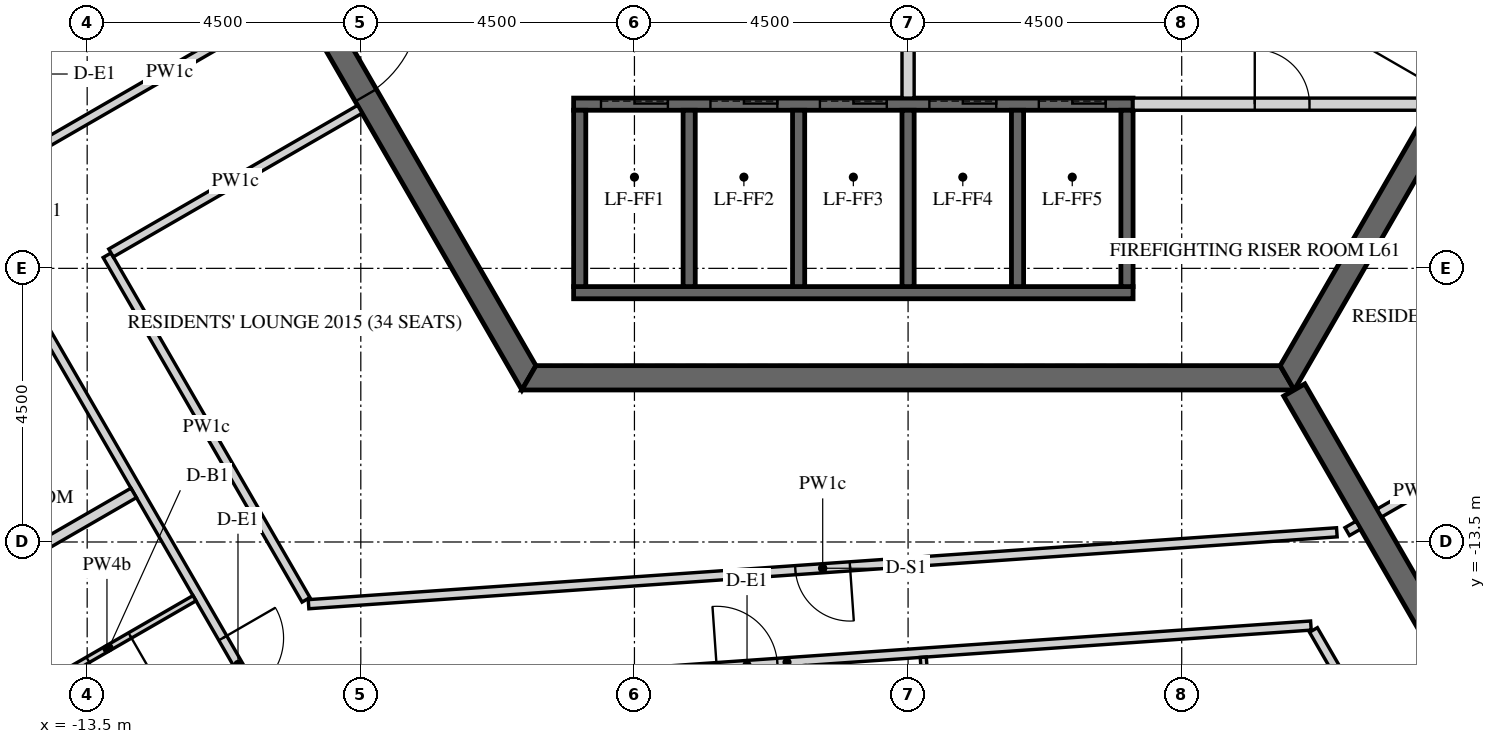
"""IFC4 building model, lengths in metres.
Left out: names, types, materials, properties, quantities, classifications, styles, units other than length and angle.
Written with IfcOpenShell. Run it as: python <this file> out.ifc"""

import sys

from ifc_helpers import new_model, si_unit, direction, frame, frame_2d, origin, place, context, subcontext, project, spatial, polyline, rectangle, outline, extrude, element, fill, save


model = new_model("IFC4")
c1 = context("Model", 3, precision=1e-05, world=origin(), true_north=direction((0.0, 1.0)))
c2 = subcontext(c1, "Body", "Model", "MODEL_VIEW")
j1 = project(units=[si_unit("LENGTHUNIT", "METRE"), si_unit("PLANEANGLEUNIT", "RADIAN")], contexts=[c1])
p1 = place(None, origin())
s1 = spatial("IfcSite", under=j1, at=p1, CompositionType="ELEMENT")
p2 = place(p1, origin())
s2 = spatial("IfcBuilding", under=s1, at=p2, CompositionType="ELEMENT")
p3 = place(p2, frame((0.0, 0.0, 256.2)))
s3 = spatial("IfcBuildingStorey", under=s2, at=p3, CompositionType="ELEMENT", Elevation=256.2)
p4 = place(p3, frame((-12.471, 0.0, 0.0), z_axis=(0.0, 0.0, 1.0), x_axis=(0.499996419489, -0.866027470984, 0.0)))
e1 = element("IfcWall", 1, at=p4, inside=s3, PredefinedType="SHEAR", context=c2, shape_type="SweptSolid", body=[
    extrude(outline(polyline([(-0.115, -0.2), (12.586, -0.2), (12.355, 0.2), (0.115, 0.2), (-0.115, -0.2)])), origin(), (0.0, 0.0, 1.0), 3.75),
])
p5 = place(p4, frame((5.306, 0.0, 0.0)))
e2 = element("IfcOpeningElement", 2, at=p5, cuts=e1, PredefinedType="OPENING", context=c2, shape_type="SweptSolid", body=[
    extrude(rectangle(XDim=1.8, YDim=2.4, at=frame_2d((0.9, 1.2))), frame((0.0, 0.21, 0.0), z_axis=(0.0, -1.0, 0.0), x_axis=(1.0, 0.0, 0.0)), (0.0, 0.0, 1.0), 0.42),
])
p6 = place(p3, frame((-6.235, -10.8, 0.0), z_axis=(0.0, 0.0, 1.0), x_axis=(1.0, 0.0, 0.0)))
e3 = element("IfcWall", 3, at=p6, inside=s3, PredefinedType="SHEAR", context=c2, shape_type="SweptSolid", body=[
    extrude(outline(polyline([(-0.115, -0.2), (12.586, -0.2), (12.355, 0.2), (0.115, 0.2), (-0.115, -0.2)])), origin(), (0.0, 0.0, 1.0), 3.75),
])
p7 = place(p3, frame((6.235, -10.8, 0.0), z_axis=(0.0, 0.0, 1.0), x_axis=(0.499996419489, 0.866027470984, 0.0)))
e4 = element("IfcWall", 4, at=p7, inside=s3, PredefinedType="SHEAR", context=c2, shape_type="SweptSolid", body=[
    extrude(outline(polyline([(-0.115, -0.2), (12.586, -0.2), (12.355, 0.2), (0.115, 0.2), (-0.115, -0.2)])), origin(), (0.0, 0.0, 1.0), 3.75),
])
p8 = place(p7, frame((5.364, 0.0, 0.0)))
e5 = element("IfcOpeningElement", 5, at=p8, cuts=e4, PredefinedType="OPENING", context=c2, shape_type="SweptSolid", body=[
    extrude(rectangle(XDim=1.8, YDim=2.4, at=frame_2d((0.9, 1.2))), frame((0.0, 0.21, 0.0), z_axis=(0.0, -1.0, 0.0), x_axis=(1.0, 0.0, 0.0)), (0.0, 0.0, 1.0), 0.42),
])
p9 = place(p3, frame((6.351, -11.0, 0.0), z_axis=(0.0, 0.0, 1.0), x_axis=(0.499998894578, -0.866026041999, 0.0)))
e6 = element("IfcWall", 6, at=p9, inside=s3, PredefinedType="SHEAR", context=c2, shape_type="SweptSolid", body=[
    extrude(rectangle(XDim=15.544, YDim=0.4, at=frame_2d((7.772, 0.0))), origin(), (0.0, 0.0, 1.0), 3.75),
])
p10 = place(p9, frame((6.872, 0.0, 0.0)))
e7 = element("IfcOpeningElement", 7, at=p10, cuts=e6, PredefinedType="OPENING", context=c2, shape_type="SweptSolid", body=[
    extrude(rectangle(XDim=1.8, YDim=2.4, at=frame_2d((0.9, 1.2))), frame((0.0, 0.21, 0.0), z_axis=(0.0, -1.0, 0.0), x_axis=(1.0, 0.0, 0.0)), (0.0, 0.0, 1.0), 0.42),
])
p11 = place(p3, frame((-5.5, -6.3, -0.5), z_axis=(0.0, 0.0, 1.0), x_axis=(1.0, 0.0, 0.0)))
e8 = element("IfcWall", 8, at=p11, inside=s3, PredefinedType="SHEAR", context=c2, shape_type="SweptSolid", body=[
    extrude(rectangle(XDim=9.2, YDim=0.2, at=frame_2d((4.6, 0.0))), origin(), (0.0, 0.0, 1.0), 4.15),
])
p12 = place(p11, frame((0.45, 0.0, 0.5)))
e9 = element("IfcOpeningElement", 9, at=p12, cuts=e8, PredefinedType="OPENING", context=c2, shape_type="SweptSolid", body=[
    extrude(rectangle(XDim=1.1, YDim=2.1, at=frame_2d((0.55, 1.05))), frame((0.0, 0.11, 0.0), z_axis=(0.0, -1.0, 0.0), x_axis=(1.0, 0.0, 0.0)), (0.0, 0.0, 1.0), 0.22),
])
p13 = place(p11, frame((2.25, 0.0, 0.5)))
e10 = element("IfcOpeningElement", 10, at=p13, cuts=e8, PredefinedType="OPENING", context=c2, shape_type="SweptSolid", body=[
    extrude(rectangle(XDim=1.1, YDim=2.1, at=frame_2d((0.55, 1.05))), frame((0.0, 0.11, 0.0), z_axis=(0.0, -1.0, 0.0), x_axis=(1.0, 0.0, 0.0)), (0.0, 0.0, 1.0), 0.22),
])
p14 = place(p11, frame((4.05, 0.0, 0.5)))
e11 = element("IfcOpeningElement", 11, at=p14, cuts=e8, PredefinedType="OPENING", context=c2, shape_type="SweptSolid", body=[
    extrude(rectangle(XDim=1.1, YDim=2.1, at=frame_2d((0.55, 1.05))), frame((0.0, 0.11, 0.0), z_axis=(0.0, -1.0, 0.0), x_axis=(1.0, 0.0, 0.0)), (0.0, 0.0, 1.0), 0.22),
])
p15 = place(p11, frame((5.85, 0.0, 0.5)))
e12 = element("IfcOpeningElement", 12, at=p15, cuts=e8, PredefinedType="OPENING", context=c2, shape_type="SweptSolid", body=[
    extrude(rectangle(XDim=1.1, YDim=2.1, at=frame_2d((0.55, 1.05))), frame((0.0, 0.11, 0.0), z_axis=(0.0, -1.0, 0.0), x_axis=(1.0, 0.0, 0.0)), (0.0, 0.0, 1.0), 0.22),
])
p16 = place(p11, frame((7.65, 0.0, 0.5)))
e13 = element("IfcOpeningElement", 13, at=p16, cuts=e8, PredefinedType="OPENING", context=c2, shape_type="SweptSolid", body=[
    extrude(rectangle(XDim=1.1, YDim=2.1, at=frame_2d((0.55, 1.05))), frame((0.0, 0.11, 0.0), z_axis=(0.0, -1.0, 0.0), x_axis=(1.0, 0.0, 0.0)), (0.0, 0.0, 1.0), 0.22),
])
p17 = place(p3, frame((-5.5, -9.4, -0.5), z_axis=(0.0, 0.0, 1.0), x_axis=(1.0, 0.0, 0.0)))
e14 = element("IfcWall", 14, at=p17, inside=s3, PredefinedType="SHEAR", context=c2, shape_type="SweptSolid", body=[
    extrude(rectangle(XDim=9.2, YDim=0.2, at=frame_2d((4.6, 0.0))), origin(), (0.0, 0.0, 1.0), 4.15),
])
for number, where, z_axis, x_axis in (
    (15, (-5.4, -9.3, -0.5), (0.0, 0.0, 1.0), (0.0, 1.0, 0.0)),
    (16, (-3.6, -9.3, -0.5), (0.0, 0.0, 1.0), (0.0, 1.0, 0.0)),
    (17, (-1.8, -9.3, -0.5), (0.0, 0.0, 1.0), (0.0, 1.0, 0.0)),
    (18, (0.0, -9.3, -0.5), (0.0, 0.0, 1.0), (0.0, 1.0, 0.0)),
    (19, (1.8, -9.3, -0.5), (0.0, 0.0, 1.0), (0.0, 1.0, 0.0)),
    (20, (3.6, -9.3, -0.5), (0.0, 0.0, 1.0), (0.0, 1.0, 0.0)),
):
    element("IfcWall", number, at=place(p3, frame(where, z_axis=z_axis, x_axis=x_axis)), inside=s3, PredefinedType="SHEAR", context=c2, shape_type="SweptSolid", body=[
        extrude(rectangle(XDim=2.9, YDim=0.2, at=frame_2d((1.45, 0.0))), origin(), (0.0, 0.0, 1.0), 4.15),
    ])
p18 = place(p3, frame((0.0, -6.2, 0.0), z_axis=(0.0, 0.0, 1.0), x_axis=(0.0, 1.0, 0.0)))
e21 = element("IfcWall", 21, at=p18, inside=s3, PredefinedType="PARTITIONING", context=c2, shape_type="SweptSolid", body=[
    extrude(rectangle(XDim=6.1, YDim=0.2, at=frame_2d((3.05, 0.0))), origin(), (0.0, 0.0, 1.0), 3.65),
])
p19 = place(p3, frame((3.7, -6.3, 0.0), z_axis=(0.0, 0.0, 1.0), x_axis=(1.0, 0.0, 0.0)))
e22 = element("IfcWall", 22, at=p19, inside=s3, PredefinedType="PARTITIONING", context=c2, shape_type="SweptSolid", body=[
    extrude(rectangle(XDim=4.903, YDim=0.2, at=frame_2d((2.451, 0.0))), origin(), (0.0, 0.0, 1.0), 3.65),
])
p20 = place(p19, frame((2.001, 0.0, 0.0)))
e23 = element("IfcOpeningElement", 23, at=p20, cuts=e22, PredefinedType="OPENING", context=c2, shape_type="SweptSolid", body=[
    extrude(rectangle(XDim=0.9, YDim=2.1, at=frame_2d((0.45, 1.05))), frame((0.0, 0.11, 0.0), z_axis=(0.0, -1.0, 0.0), x_axis=(1.0, 0.0, 0.0)), (0.0, 0.0, 1.0), 0.22),
])
p21 = place(p3, frame((-18.338, -2.838, 0.0), z_axis=(0.0, 0.0, 1.0), x_axis=(0.499999693481, -0.866025580753, 0.0)))
e24 = element("IfcWall", 24, at=p21, inside=s3, PredefinedType="PARTITIONING", context=c2, shape_type="SweptSolid", body=[
    extrude(rectangle(XDim=15.296, YDim=0.15, at=frame_2d((7.648, 0.0))), origin(), (0.0, 0.0, 1.0), 2.823),
])
p22 = place(p21, frame((2.925, 0.0, 0.0)))
e25 = element("IfcOpeningElement", 25, at=p22, cuts=e24, PredefinedType="OPENING", context=c2, shape_type="SweptSolid", body=[
    extrude(rectangle(XDim=1.0, YDim=2.1, at=frame_2d((0.5, 1.05))), frame((0.0, 0.085, 0.0), z_axis=(0.0, -1.0, 0.0), x_axis=(1.0, 0.0, 0.0)), (0.0, 0.0, 1.0), 0.17),
])
p23 = place(p21, frame((14.136, 0.0, 0.0)))
e26 = element("IfcOpeningElement", 26, at=p23, cuts=e24, PredefinedType="OPENING", context=c2, shape_type="SweptSolid", body=[
    extrude(rectangle(XDim=1.0, YDim=2.1, at=frame_2d((0.5, 1.05))), frame((0.0, 0.085, 0.0), z_axis=(0.0, -1.0, 0.0), x_axis=(1.0, 0.0, 0.0)), (0.0, 0.0, 1.0), 0.17),
])
p24 = place(p3, frame((-10.606, -16.079, 0.0), z_axis=(0.0, 0.0, 1.0), x_axis=(0.997563356349, 0.069766396426, 0.0)))
e27 = element("IfcWall", 27, at=p24, inside=s3, PredefinedType="PARTITIONING", context=c2, shape_type="SweptSolid", body=[
    extrude(rectangle(XDim=17.273, YDim=0.15, at=frame_2d((8.636, 0.0))), origin(), (0.0, 0.0, 1.0), 2.823),
])
p25 = place(p24, frame((7.478, 0.0, 0.0)))
e28 = element("IfcOpeningElement", 28, at=p25, cuts=e27, PredefinedType="OPENING", context=c2, shape_type="SweptSolid", body=[
    extrude(rectangle(XDim=1.0, YDim=2.1, at=frame_2d((0.5, 1.05))), frame((0.0, 0.085, 0.0), z_axis=(0.0, -1.0, 0.0), x_axis=(1.0, 0.0, 0.0)), (0.0, 0.0, 1.0), 0.17),
])
p26 = place(p3, frame((6.666, -14.946, 0.0), z_axis=(0.0, 0.0, 1.0), x_axis=(0.499979539361, -0.866037216418, 0.0)))
e29 = element("IfcWall", 29, at=p26, inside=s3, PredefinedType="PARTITIONING", context=c2, shape_type="SweptSolid", body=[
    extrude(rectangle(XDim=7.097, YDim=0.15, at=frame_2d((3.548, 0.0))), origin(), (0.0, 0.0, 1.0), 2.823),
])
p27 = place(p3, frame((-10.066, -4.566, 0.0), z_axis=(0.0, 0.0, 1.0), x_axis=(-0.866037363387, -0.499979284789, 0.0)))
e30 = element("IfcWall", 30, at=p27, inside=s3, PredefinedType="PARTITIONING", context=c2, shape_type="SweptSolid", body=[
    extrude(rectangle(XDim=4.8, YDim=0.15, at=frame_2d((2.4, 0.0))), origin(), (0.0, 0.0, 1.0), 2.823),
])
p28 = place(p3, frame((7.404, -13.224, 0.0), z_axis=(0.0, 0.0, 1.0), x_axis=(-0.866088799389, -0.499890179513, 0.0)))
e31 = element("IfcWall", 31, at=p28, inside=s3, PredefinedType="PARTITIONING", context=c2, shape_type="SweptSolid", body=[
    extrude(rectangle(XDim=0.21, YDim=0.15, at=frame_2d((0.105, 0.0))), origin(), (0.0, 0.0, 1.0), 2.823),
])
p29 = place(p3, frame((7.051, -13.341, 0.0), z_axis=(0.0, 0.0, 1.0), x_axis=(-0.997563599815, -0.069762915103, 0.0)))
e32 = element("IfcWall", 32, at=p29, inside=s3, PredefinedType="PARTITIONING", context=c2, shape_type="SweptSolid", body=[
    extrude(rectangle(XDim=16.952, YDim=0.15, at=frame_2d((8.476, 0.0))), origin(), (0.0, 0.0, 1.0), 2.823),
])
p30 = place(p29, frame((8.026, 0.0, 0.0)))
e33 = element("IfcOpeningElement", 33, at=p30, cuts=e32, PredefinedType="OPENING", context=c2, shape_type="SweptSolid", body=[
    extrude(rectangle(XDim=0.9, YDim=2.1, at=frame_2d((0.45, 1.05))), frame((0.0, 0.085, 0.0), z_axis=(0.0, -1.0, 0.0), x_axis=(1.0, 0.0, 0.0)), (0.0, 0.0, 1.0), 0.17),
])
p31 = place(p3, frame((-9.901, -14.451, 0.0), z_axis=(0.0, 0.0, 1.0), x_axis=(-0.49999161165, 0.866030246746, 0.0)))
e34 = element("IfcWall", 34, at=p31, inside=s3, PredefinedType="PARTITIONING", context=c2, shape_type="SweptSolid", body=[
    extrude(rectangle(XDim=6.543, YDim=0.15, at=frame_2d((3.271, 0.0))), origin(), (0.0, 0.0, 1.0), 2.823),
])
p32 = place(p3, frame((-13.108, -8.747, 0.0), z_axis=(0.0, 0.0, 1.0), x_axis=(0.866024684746, 0.500001245408, 0.0)))
e35 = element("IfcWall", 35, at=p32, inside=s3, PredefinedType="PARTITIONING", context=c2, shape_type="SweptSolid", body=[
    extrude(rectangle(XDim=4.725, YDim=0.15, at=frame_2d((2.363, 0.0))), origin(), (0.0, 0.0, 1.0), 2.823),
])
p33 = place(p3, frame((8.984, -12.311, 0.0), z_axis=(0.0, 0.0, 1.0), x_axis=(-0.866020080793, -0.500009219579, 0.0)))
e36 = element("IfcWall", 36, at=p33, inside=s3, PredefinedType="PARTITIONING", context=c2, shape_type="SweptSolid", body=[
    extrude(rectangle(XDim=1.425, YDim=0.15, at=frame_2d((0.712, 0.0))), origin(), (0.0, 0.0, 1.0), 2.823),
])
p34 = place(p3, frame((-19.771, -16.755, 0.0), z_axis=(0.0, 0.0, 1.0), x_axis=(0.866022959057, 0.500004234368, 0.0)))
e37 = element("IfcWall", 37, at=p34, inside=s3, PredefinedType="PARTITIONING", context=c2, shape_type="SweptSolid", body=[
    extrude(rectangle(XDim=8.125, YDim=0.18, at=frame_2d((4.062, 0.0))), origin(), (0.0, 0.0, 1.0), 2.823),
])
p35 = place(p3, frame((-11.735, -14.425, 0.0), z_axis=(0.0, 0.0, 1.0), x_axis=(-0.866033959199, -0.499985181294, 0.0)))
e38 = element("IfcWall", 38, at=p35, inside=s3, PredefinedType="PARTITIONING", context=c2, shape_type="SweptSolid", body=[
    extrude(rectangle(XDim=3.325, YDim=0.1, at=frame_2d((1.662, 0.0))), origin(), (0.0, 0.0, 1.0), 2.823),
])
p36 = place(p35, frame((1.225, 0.0, 0.0)))
e39 = element("IfcOpeningElement", 39, at=p36, cuts=e38, PredefinedType="OPENING", context=c2, shape_type="SweptSolid", body=[
    extrude(rectangle(XDim=0.8, YDim=2.1, at=frame_2d((0.4, 1.05))), frame((0.0, 0.06, 0.0), z_axis=(0.0, -1.0, 0.0), x_axis=(1.0, 0.0, 0.0)), (0.0, 0.0, 1.0), 0.12),
])
p37 = place(p3, frame((0.25, -15.395, 0.0), z_axis=(0.0, 0.0, 1.0), x_axis=(0.069754598287, -0.997564181403, 0.0)))
e40 = element("IfcWall", 40, at=p37, inside=s3, PredefinedType="PARTITIONING", context=c2, shape_type="SweptSolid", body=[
    extrude(rectangle(XDim=3.325, YDim=0.1, at=frame_2d((1.663, 0.0))), origin(), (0.0, 0.0, 1.0), 2.823),
])
p38 = place(p5, origin())
e41 = element("IfcDoor", 41, at=p38, inside=s3, OperationType="DOUBLE_DOOR_SINGLE_SWING", PredefinedType="DOOR", context=c2, shape_type="SweptSolid", body=[
    extrude(rectangle(XDim=1.8, YDim=2.4, at=frame_2d((0.9, 1.2))), frame((0.0, 0.025, 0.0), z_axis=(0.0, -1.0, 0.0), x_axis=(1.0, 0.0, 0.0)), (0.0, 0.0, 1.0), 0.05),
])
fill(e2, e41)
p39 = place(p20, origin())
e42 = element("IfcDoor", 42, at=p39, inside=s3, OperationType="SINGLE_SWING_LEFT", PredefinedType="DOOR", context=c2, shape_type="SweptSolid", body=[
    extrude(rectangle(XDim=0.9, YDim=2.1, at=frame_2d((0.45, 1.05))), frame((0.0, 0.025, 0.0), z_axis=(0.0, -1.0, 0.0), x_axis=(1.0, 0.0, 0.0)), (0.0, 0.0, 1.0), 0.05),
])
fill(e23, e42)
p40 = place(p12, origin())
e43 = element("IfcDoor", 43, at=p40, inside=s3, OperationType="SLIDING_TO_LEFT", PredefinedType="DOOR", context=c2, shape_type="SweptSolid", body=[
    extrude(rectangle(XDim=1.1, YDim=2.1, at=frame_2d((0.55, 1.05))), frame((0.0, 0.025, 0.0), z_axis=(0.0, -1.0, 0.0), x_axis=(1.0, 0.0, 0.0)), (0.0, 0.0, 1.0), 0.05),
])
fill(e9, e43)
p41 = place(p13, origin())
e44 = element("IfcDoor", 44, at=p41, inside=s3, OperationType="SLIDING_TO_LEFT", PredefinedType="DOOR", context=c2, shape_type="SweptSolid", body=[
    extrude(rectangle(XDim=1.1, YDim=2.1, at=frame_2d((0.55, 1.05))), frame((0.0, 0.025, 0.0), z_axis=(0.0, -1.0, 0.0), x_axis=(1.0, 0.0, 0.0)), (0.0, 0.0, 1.0), 0.05),
])
fill(e10, e44)
p42 = place(p14, origin())
e45 = element("IfcDoor", 45, at=p42, inside=s3, OperationType="SLIDING_TO_LEFT", PredefinedType="DOOR", context=c2, shape_type="SweptSolid", body=[
    extrude(rectangle(XDim=1.1, YDim=2.1, at=frame_2d((0.55, 1.05))), frame((0.0, 0.025, 0.0), z_axis=(0.0, -1.0, 0.0), x_axis=(1.0, 0.0, 0.0)), (0.0, 0.0, 1.0), 0.05),
])
fill(e11, e45)
p43 = place(p15, origin())
e46 = element("IfcDoor", 46, at=p43, inside=s3, OperationType="SLIDING_TO_LEFT", PredefinedType="DOOR", context=c2, shape_type="SweptSolid", body=[
    extrude(rectangle(XDim=1.1, YDim=2.1, at=frame_2d((0.55, 1.05))), frame((0.0, 0.025, 0.0), z_axis=(0.0, -1.0, 0.0), x_axis=(1.0, 0.0, 0.0)), (0.0, 0.0, 1.0), 0.05),
])
fill(e12, e46)
p44 = place(p16, origin())
e47 = element("IfcDoor", 47, at=p44, inside=s3, OperationType="SLIDING_TO_LEFT", PredefinedType="DOOR", context=c2, shape_type="SweptSolid", body=[
    extrude(rectangle(XDim=1.1, YDim=2.1, at=frame_2d((0.55, 1.05))), frame((0.0, 0.025, 0.0), z_axis=(0.0, -1.0, 0.0), x_axis=(1.0, 0.0, 0.0)), (0.0, 0.0, 1.0), 0.05),
])
fill(e13, e47)
p45 = place(p23, origin())
e48 = element("IfcDoor", 48, at=p45, inside=s3, OperationType="SINGLE_SWING_LEFT", PredefinedType="DOOR", context=c2, shape_type="SweptSolid", body=[
    extrude(rectangle(XDim=1.0, YDim=2.1, at=frame_2d((0.5, 1.05))), frame((0.0, 0.025, 0.0), z_axis=(0.0, -1.0, 0.0), x_axis=(1.0, 0.0, 0.0)), (0.0, 0.0, 1.0), 0.05),
])
fill(e26, e48)
p46 = place(p36, origin())
e49 = element("IfcDoor", 49, at=p46, inside=s3, OperationType="SINGLE_SWING_RIGHT", PredefinedType="DOOR", context=c2, shape_type="SweptSolid", body=[
    extrude(rectangle(XDim=0.8, YDim=2.1, at=frame_2d((0.4, 1.05))), frame((0.0, 0.025, 0.0), z_axis=(0.0, -1.0, 0.0), x_axis=(1.0, 0.0, 0.0)), (0.0, 0.0, 1.0), 0.05),
])
fill(e39, e49)
p47 = place(p25, origin())
e50 = element("IfcDoor", 50, at=p47, inside=s3, OperationType="SINGLE_SWING_RIGHT", PredefinedType="DOOR", context=c2, shape_type="SweptSolid", body=[
    extrude(rectangle(XDim=1.0, YDim=2.1, at=frame_2d((0.5, 1.05))), frame((0.0, 0.025, 0.0), z_axis=(0.0, -1.0, 0.0), x_axis=(1.0, 0.0, 0.0)), (0.0, 0.0, 1.0), 0.05),
])
fill(e28, e50)
p48 = place(p30, origin())
e51 = element("IfcDoor", 51, at=p48, inside=s3, OperationType="SINGLE_SWING_LEFT", PredefinedType="DOOR", context=c2, shape_type="SweptSolid", body=[
    extrude(rectangle(XDim=0.9, YDim=2.1, at=frame_2d((0.45, 1.05))), frame((0.0, 0.025, 0.0), z_axis=(0.0, -1.0, 0.0), x_axis=(1.0, 0.0, 0.0)), (0.0, 0.0, 1.0), 0.05),
])
fill(e33, e51)
save(model, sys.argv[1])
